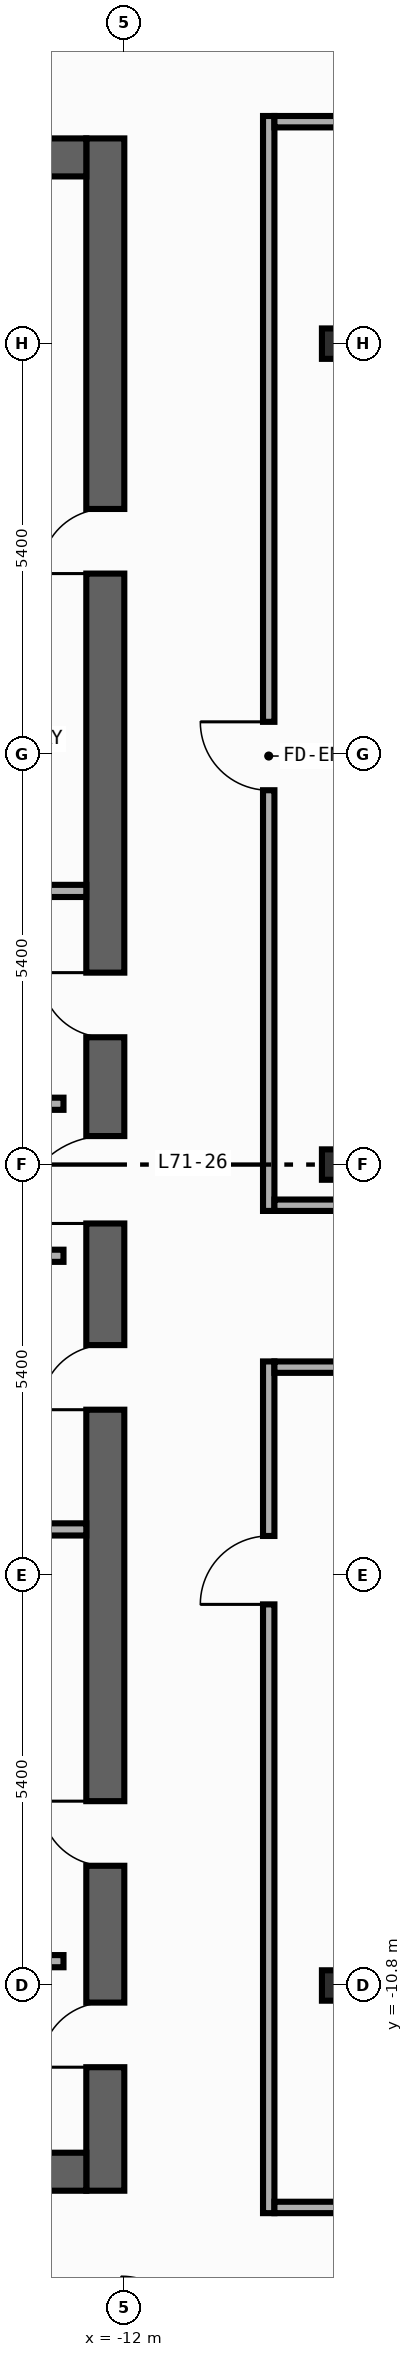
"""IFC4 building model, lengths in metres.
Left out: names, types, materials, properties, quantities, classifications, styles, units other than length and angle.
Written with IfcOpenShell. Run it as: python <this file> out.ifc"""

import sys

from ifc_helpers import new_model, si_unit, direction, frame, frame_2d, origin, origin_2d, place, context, subcontext, project, spatial, rectangle, i_section, extrude, element, fill, save


model = new_model("IFC4")
c1 = context("Model", 3, precision=1e-05, world=origin(), true_north=direction((0.0, 1.0)))
c2 = subcontext(c1, "Body", "Model", "MODEL_VIEW")
j1 = project(units=[si_unit("LENGTHUNIT", "METRE"), si_unit("PLANEANGLEUNIT", "RADIAN")], contexts=[c1])
p1 = place(None, origin())
s1 = spatial("IfcSite", under=j1, at=p1, CompositionType="ELEMENT")
p2 = place(p1, origin())
s2 = spatial("IfcBuilding", under=s1, at=p2, CompositionType="ELEMENT")
p3 = place(p2, frame((0.0, 0.0, 296.6)))
s3 = spatial("IfcBuildingStorey", under=s2, at=p3, CompositionType="ELEMENT", Elevation=296.6)
p4 = place(p3, frame((-12.25, -13.5, 0.0), z_axis=(0.0, 0.0, 1.0), x_axis=(0.0, 1.0, 0.0)))
e1 = element("IfcWall", 1, at=p4, inside=s3, PredefinedType="SHEAR", context=c2, shape_type="SweptSolid", body=[
    extrude(rectangle(XDim=27.0, YDim=0.5, at=frame_2d((13.5, 0.0))), origin(), (0.0, 0.0, 1.0), 3.54),
])
p5 = place(p4, frame((15.175, 0.0, 0.0)))
e2 = element("IfcOpeningElement", 2, at=p5, cuts=e1, PredefinedType="OPENING", context=c2, shape_type="SweptSolid", body=[
    extrude(rectangle(XDim=0.85, YDim=2.1, at=frame_2d((0.425, 1.05))), frame((0.0, 0.26, 0.0), z_axis=(0.0, -1.0, 0.0), x_axis=(1.0, 0.0, 0.0)), (0.0, 0.0, 1.0), 0.52),
])
p6 = place(p4, frame((21.275, 0.0, 0.0)))
e3 = element("IfcOpeningElement", 3, at=p6, cuts=e1, PredefinedType="OPENING", context=c2, shape_type="SweptSolid", body=[
    extrude(rectangle(XDim=0.85, YDim=2.1, at=frame_2d((0.425, 1.05))), frame((0.0, 0.26, 0.0), z_axis=(0.0, -1.0, 0.0), x_axis=(1.0, 0.0, 0.0)), (0.0, 0.0, 1.0), 0.52),
])
p7 = place(p4, frame((4.275, 0.0, 0.0)))
e4 = element("IfcOpeningElement", 4, at=p7, cuts=e1, PredefinedType="OPENING", context=c2, shape_type="SweptSolid", body=[
    extrude(rectangle(XDim=0.85, YDim=2.1, at=frame_2d((0.425, 1.05))), frame((0.0, 0.26, 0.0), z_axis=(0.0, -1.0, 0.0), x_axis=(1.0, 0.0, 0.0)), (0.0, 0.0, 1.0), 0.52),
])
p8 = place(p4, frame((10.275, 0.0, 0.0)))
e5 = element("IfcOpeningElement", 5, at=p8, cuts=e1, PredefinedType="OPENING", context=c2, shape_type="SweptSolid", body=[
    extrude(rectangle(XDim=0.85, YDim=2.1, at=frame_2d((0.425, 1.05))), frame((0.0, 0.26, 0.0), z_axis=(0.0, -1.0, 0.0), x_axis=(1.0, 0.0, 0.0)), (0.0, 0.0, 1.0), 0.52),
])
p9 = place(p4, frame((12.725, 0.0, 0.0)))
e6 = element("IfcOpeningElement", 6, at=p9, cuts=e1, PredefinedType="OPENING", context=c2, shape_type="SweptSolid", body=[
    extrude(rectangle(XDim=1.15, YDim=2.2, at=frame_2d((0.575, 1.1))), frame((0.0, 0.26, 0.0), z_axis=(0.0, -1.0, 0.0), x_axis=(1.0, 0.0, 0.0)), (0.0, 0.0, 1.0), 0.52),
])
p10 = place(p4, frame((1.625, 0.0, 0.0)))
e7 = element("IfcOpeningElement", 7, at=p10, cuts=e1, PredefinedType="OPENING", context=c2, shape_type="SweptSolid", body=[
    extrude(rectangle(XDim=0.85, YDim=2.1, at=frame_2d((0.425, 1.05))), frame((0.0, 0.26, 0.0), z_axis=(0.0, -1.0, 0.0), x_axis=(1.0, 0.0, 0.0)), (0.0, 0.0, 1.0), 0.52),
])
for number, where, z_axis, x_axis in (
    (8, (-19.9, -13.25, 0.0), (0.0, 0.0, 1.0), (1.0, 0.0, 0.0)),
    (9, (-19.9, 13.25, 0.0), (0.0, 0.0, 1.0), (1.0, 0.0, 0.0)),
):
    element("IfcWall", number, at=place(p3, frame(where, z_axis=z_axis, x_axis=x_axis)), inside=s3, PredefinedType="SHEAR", context=c2, shape_type="SweptSolid", body=[
        extrude(rectangle(XDim=7.4, YDim=0.5, at=frame_2d((3.7, 0.0))), origin(), (0.0, 0.0, 1.0), 3.54),
    ])
for number, where, z_axis, x_axis in (
    (10, (-9.2, -10.8, 0.0), (0.0, 0.0, 1.0), (1.0, 0.0, 0.0)),
    (11, (-9.2, 0.0, 0.0), (0.0, 0.0, 1.0), (1.0, 0.0, 0.0)),
    (12, (-9.2, 10.8, 0.0), (0.0, 0.0, 1.0), (1.0, 0.0, 0.0)),
):
    element("IfcColumn", number, at=place(p3, frame(where, z_axis=z_axis, x_axis=x_axis)), inside=s3, PredefinedType="COLUMN", context=c2, shape_type="SweptSolid", body=[
        extrude(i_section(OverallWidth=0.4, OverallDepth=0.4, WebThickness=0.013, FlangeThickness=0.021, FilletRadius=0.022, at=origin_2d()), origin(), (0.0, 0.0, 1.0), 3.8),
    ])
for number, where, z_axis, x_axis in (
    (13, (-15.4, 0.8, 0.0), (0.0, 0.0, 1.0), (1.0, 0.0, 0.0)),
    (14, (-15.4, -1.2, 0.0), (0.0, 0.0, 1.0), (1.0, 0.0, 0.0)),
    (15, (-15.4, -10.48, 0.0), (0.0, 0.0, 1.0), (1.0, 0.0, 0.0)),
):
    element("IfcWall", number, at=place(p3, frame(where, z_axis=z_axis, x_axis=x_axis)), inside=s3, PredefinedType="STANDARD", context=c2, shape_type="SweptSolid", body=[
        extrude(rectangle(XDim=2.6, YDim=0.16, at=frame_2d((1.3, 0.0))), origin(), (0.0, 0.0, 1.0), 3.54),
    ])
for number, where, z_axis, x_axis in (
    (16, (-15.4, 3.6, 0.0), (0.0, 0.0, 1.0), (1.0, 0.0, 0.0)),
    (17, (-15.4, -4.8, 0.0), (0.0, 0.0, 1.0), (1.0, 0.0, 0.0)),
):
    element("IfcWall", number, at=place(p3, frame(where, z_axis=z_axis, x_axis=x_axis)), inside=s3, PredefinedType="PARTITIONING", context=c2, shape_type="SweptSolid", body=[
        extrude(rectangle(XDim=2.9, YDim=0.16, at=frame_2d((1.45, 0.0))), origin(), (0.0, 0.0, 1.0), 3.54),
    ])
p11 = place(p3, frame((-10.1, -0.61, 0.0), z_axis=(0.0, 0.0, 1.0), x_axis=(0.0, 1.0, 0.0)))
e18 = element("IfcWall", 18, at=p11, inside=s3, PredefinedType="PARTITIONING", context=c2, shape_type="SweptSolid", body=[
    extrude(rectangle(XDim=14.405, YDim=0.15, at=frame_2d((7.203, 0.0))), origin(), (0.0, 0.0, 1.0), 3.54),
])
p12 = place(p11, frame((5.535, 0.0, 0.0)))
e19 = element("IfcOpeningElement", 19, at=p12, cuts=e18, PredefinedType="OPENING", context=c2, shape_type="SweptSolid", body=[
    extrude(rectangle(XDim=0.9, YDim=2.15, at=frame_2d((0.45, 1.075))), frame((0.0, 0.085, 0.0), z_axis=(0.0, -1.0, 0.0), x_axis=(1.0, 0.0, 0.0)), (0.0, 0.0, 1.0), 0.17),
])
p13 = place(p3, frame((-10.1, -13.795, 0.0), z_axis=(0.0, 0.0, 1.0), x_axis=(0.0, 1.0, 0.0)))
e20 = element("IfcWall", 20, at=p13, inside=s3, PredefinedType="PARTITIONING", context=c2, shape_type="SweptSolid", body=[
    extrude(rectangle(XDim=11.205, YDim=0.15, at=frame_2d((5.603, 0.0))), origin(), (0.0, 0.0, 1.0), 3.54),
])
p14 = place(p13, frame((8.009, 0.0, 0.0)))
e21 = element("IfcOpeningElement", 21, at=p14, cuts=e20, PredefinedType="OPENING", context=c2, shape_type="SweptSolid", body=[
    extrude(rectangle(XDim=0.9, YDim=2.15, at=frame_2d((0.45, 1.075))), frame((0.0, 0.085, 0.0), z_axis=(0.0, -1.0, 0.0), x_axis=(1.0, 0.0, 0.0)), (0.0, 0.0, 1.0), 0.17),
])
p15 = place(p3, frame((-10.025, -0.535, 0.0), z_axis=(0.0, 0.0, 1.0), x_axis=(1.0, 0.0, 0.0)))
e22 = element("IfcWall", 22, at=p15, inside=s3, PredefinedType="PARTITIONING", context=c2, shape_type="SweptSolid", body=[
    extrude(rectangle(XDim=7.835, YDim=0.15, at=frame_2d((3.917, 0.0))), origin(), (0.0, 0.0, 1.0), 3.54),
])
p16 = place(p15, frame((6.475, 0.0, 0.0)))
e23 = element("IfcOpeningElement", 23, at=p16, cuts=e22, PredefinedType="OPENING", context=c2, shape_type="SweptSolid", body=[
    extrude(rectangle(XDim=0.9, YDim=2.15, at=frame_2d((0.45, 1.075))), frame((0.0, 0.085, 0.0), z_axis=(0.0, -1.0, 0.0), x_axis=(1.0, 0.0, 0.0)), (0.0, 0.0, 1.0), 0.17),
])
p17 = place(p3, frame((-10.025, -2.665, 0.0), z_axis=(0.0, 0.0, 1.0), x_axis=(1.0, 0.0, 0.0)))
e24 = element("IfcWall", 24, at=p17, inside=s3, PredefinedType="PARTITIONING", context=c2, shape_type="SweptSolid", body=[
    extrude(rectangle(XDim=7.855, YDim=0.15, at=frame_2d((3.927, 0.0))), origin(), (0.0, 0.0, 1.0), 3.54),
])
p18 = place(p17, frame((6.495, 0.0, 0.0)))
e25 = element("IfcOpeningElement", 25, at=p18, cuts=e24, PredefinedType="OPENING", context=c2, shape_type="SweptSolid", body=[
    extrude(rectangle(XDim=0.9, YDim=2.15, at=frame_2d((0.45, 1.075))), frame((0.0, 0.085, 0.0), z_axis=(0.0, -1.0, 0.0), x_axis=(1.0, 0.0, 0.0)), (0.0, 0.0, 1.0), 0.17),
])
p19 = place(p3, frame((-10.025, 13.72, 0.0), z_axis=(0.0, 0.0, 1.0), x_axis=(1.0, 0.0, 0.0)))
e26 = element("IfcWall", 26, at=p19, inside=s3, PredefinedType="PARTITIONING", context=c2, shape_type="SweptSolid", body=[
    extrude(rectangle(XDim=7.685, YDim=0.15, at=frame_2d((3.842, 0.0))), origin(), (0.0, 0.0, 1.0), 3.54),
])
p20 = place(p19, frame((6.325, 0.0, 0.0)))
e27 = element("IfcOpeningElement", 27, at=p20, cuts=e26, PredefinedType="OPENING", context=c2, shape_type="SweptSolid", body=[
    extrude(rectangle(XDim=0.9, YDim=2.15, at=frame_2d((0.45, 1.075))), frame((0.0, 0.085, 0.0), z_axis=(0.0, -1.0, 0.0), x_axis=(1.0, 0.0, 0.0)), (0.0, 0.0, 1.0), 0.17),
])
p21 = place(p3, frame((-10.025, -13.72, 0.0), z_axis=(0.0, 0.0, 1.0), x_axis=(1.0, 0.0, 0.0)))
e28 = element("IfcWall", 28, at=p21, inside=s3, PredefinedType="PARTITIONING", context=c2, shape_type="SweptSolid", body=[
    extrude(rectangle(XDim=7.855, YDim=0.15, at=frame_2d((3.927, 0.0))), origin(), (0.0, 0.0, 1.0), 3.54),
])
p22 = place(p21, frame((6.495, 0.0, 0.0)))
e29 = element("IfcOpeningElement", 29, at=p22, cuts=e28, PredefinedType="OPENING", context=c2, shape_type="SweptSolid", body=[
    extrude(rectangle(XDim=0.9, YDim=2.15, at=frame_2d((0.45, 1.075))), frame((0.0, 0.085, 0.0), z_axis=(0.0, -1.0, 0.0), x_axis=(1.0, 0.0, 0.0)), (0.0, 0.0, 1.0), 0.17),
])
p23 = place(p5, origin())
e30 = element("IfcDoor", 30, at=p23, inside=s3, OperationType="SINGLE_SWING_RIGHT", PredefinedType="DOOR", context=c2, shape_type="SweptSolid", body=[
    extrude(rectangle(XDim=0.85, YDim=2.1, at=frame_2d((0.425, 1.05))), frame((0.0, 0.025, 0.0), z_axis=(0.0, -1.0, 0.0), x_axis=(1.0, 0.0, 0.0)), (0.0, 0.0, 1.0), 0.05),
])
fill(e2, e30)
p24 = place(p6, origin())
e31 = element("IfcDoor", 31, at=p24, inside=s3, OperationType="SINGLE_SWING_LEFT", PredefinedType="DOOR", context=c2, shape_type="SweptSolid", body=[
    extrude(rectangle(XDim=0.85, YDim=2.1, at=frame_2d((0.425, 1.05))), frame((0.0, 0.025, 0.0), z_axis=(0.0, -1.0, 0.0), x_axis=(1.0, 0.0, 0.0)), (0.0, 0.0, 1.0), 0.05),
])
fill(e3, e31)
p25 = place(p7, origin())
e32 = element("IfcDoor", 32, at=p25, inside=s3, OperationType="SINGLE_SWING_RIGHT", PredefinedType="DOOR", context=c2, shape_type="SweptSolid", body=[
    extrude(rectangle(XDim=0.85, YDim=2.1, at=frame_2d((0.425, 1.05))), frame((0.0, 0.025, 0.0), z_axis=(0.0, -1.0, 0.0), x_axis=(1.0, 0.0, 0.0)), (0.0, 0.0, 1.0), 0.05),
])
fill(e4, e32)
p26 = place(p8, origin())
e33 = element("IfcDoor", 33, at=p26, inside=s3, OperationType="SINGLE_SWING_LEFT", PredefinedType="DOOR", context=c2, shape_type="SweptSolid", body=[
    extrude(rectangle(XDim=0.85, YDim=2.1, at=frame_2d((0.425, 1.05))), frame((0.0, 0.025, 0.0), z_axis=(0.0, -1.0, 0.0), x_axis=(1.0, 0.0, 0.0)), (0.0, 0.0, 1.0), 0.05),
])
fill(e5, e33)
p27 = place(p9, origin())
e34 = element("IfcDoor", 34, at=p27, inside=s3, OperationType="SINGLE_SWING_LEFT", PredefinedType="DOOR", context=c2, shape_type="SweptSolid", body=[
    extrude(rectangle(XDim=1.15, YDim=2.2, at=frame_2d((0.575, 1.1))), frame((0.0, 0.025, 0.0), z_axis=(0.0, -1.0, 0.0), x_axis=(1.0, 0.0, 0.0)), (0.0, 0.0, 1.0), 0.05),
])
fill(e6, e34)
p28 = place(p10, origin())
e35 = element("IfcDoor", 35, at=p28, inside=s3, OperationType="SINGLE_SWING_LEFT", PredefinedType="DOOR", context=c2, shape_type="SweptSolid", body=[
    extrude(rectangle(XDim=0.85, YDim=2.1, at=frame_2d((0.425, 1.05))), frame((0.0, 0.025, 0.0), z_axis=(0.0, -1.0, 0.0), x_axis=(1.0, 0.0, 0.0)), (0.0, 0.0, 1.0), 0.05),
])
fill(e7, e35)
p29 = place(p12, origin())
e36 = element("IfcDoor", 36, at=p29, inside=s3, OperationType="SINGLE_SWING_RIGHT", PredefinedType="DOOR", context=c2, shape_type="SweptSolid", body=[
    extrude(rectangle(XDim=0.9, YDim=2.15, at=frame_2d((0.45, 1.075))), frame((0.0, 0.025, 0.0), z_axis=(0.0, -1.0, 0.0), x_axis=(1.0, 0.0, 0.0)), (0.0, 0.0, 1.0), 0.05),
])
fill(e19, e36)
p30 = place(p14, origin())
e37 = element("IfcDoor", 37, at=p30, inside=s3, OperationType="SINGLE_SWING_LEFT", PredefinedType="DOOR", context=c2, shape_type="SweptSolid", body=[
    extrude(rectangle(XDim=0.9, YDim=2.15, at=frame_2d((0.45, 1.075))), frame((0.0, 0.025, 0.0), z_axis=(0.0, -1.0, 0.0), x_axis=(1.0, 0.0, 0.0)), (0.0, 0.0, 1.0), 0.05),
])
fill(e21, e37)
save(model, sys.argv[1])
